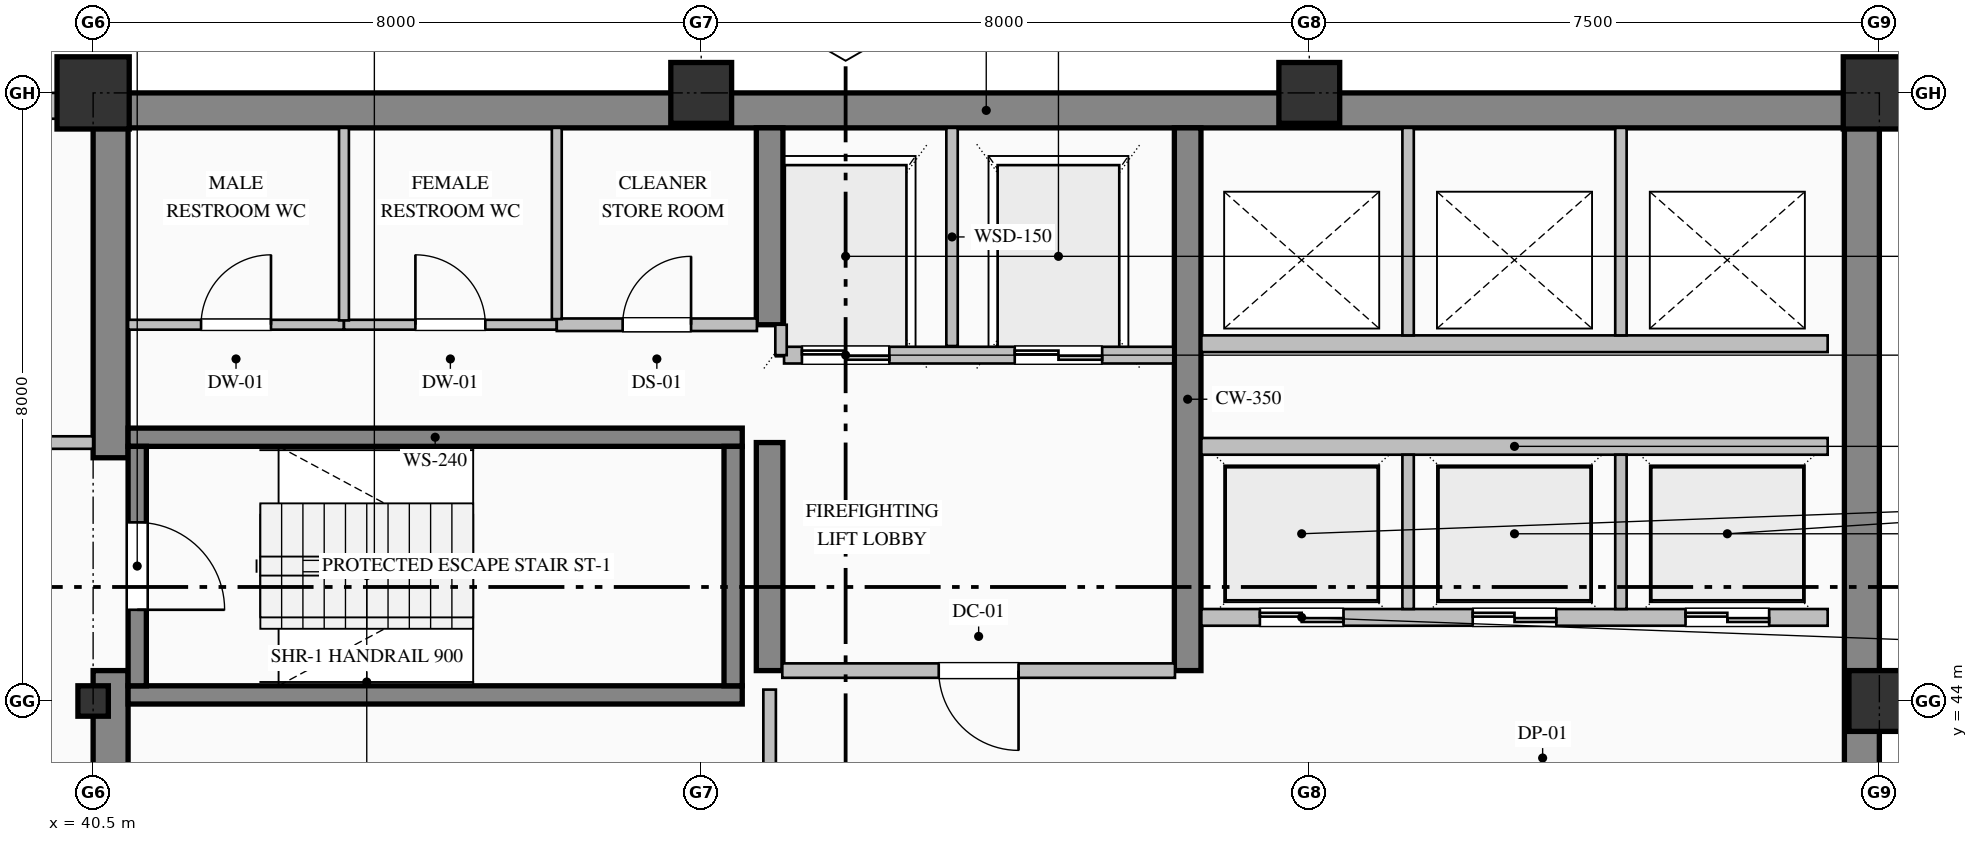
"""IFC4 building model, lengths in metres.
Left out: names, types, materials, properties, quantities, classifications, styles, units other than length and angle.
Written with IfcOpenShell. Run it as: python <this file> out.ifc"""

import sys

from ifc_helpers import new_model, si_unit, direction, frame, frame_2d, origin, origin_2d, place, context, subcontext, project, spatial, rectangle, hollow_rectangle, i_section, extrude, element, fill, save


model = new_model("IFC4")
c1 = context("Model", 3, precision=1e-05, world=origin(), true_north=direction((0.0, 1.0)))
c2 = subcontext(c1, "Body", "Model", "MODEL_VIEW")
j1 = project(units=[si_unit("LENGTHUNIT", "METRE"), si_unit("PLANEANGLEUNIT", "RADIAN")], contexts=[c1])
p1 = place(None, origin())
s1 = spatial("IfcSite", under=j1, at=p1, CompositionType="ELEMENT")
p2 = place(p1, origin())
s2 = spatial("IfcBuilding", under=s1, at=p2, CompositionType="ELEMENT")
p3 = place(p2, frame((0.0, 0.0, 269.8)))
s3 = spatial("IfcBuildingStorey", under=s2, at=p3, CompositionType="ELEMENT", Elevation=269.8)
p4 = place(p3, frame((40.5, 51.77, 0.0), z_axis=(0.0, 0.0, 1.0), x_axis=(1.0, 0.0, 0.0)))
e1 = element("IfcWall", 1, at=p4, inside=s3, PredefinedType="SHEAR", context=c2, shape_type="SweptSolid", body=[
    extrude(rectangle(XDim=23.5, YDim=0.46, at=frame_2d((11.75, 0.0))), origin(), (0.0, 0.0, 1.0), 3.775),
])
p5 = place(p3, frame((63.77, 36.32, 0.0), z_axis=(0.0, 0.0, 1.0), x_axis=(0.0, 1.0, 0.0)))
e2 = element("IfcWall", 2, at=p5, inside=s3, PredefinedType="SHEAR", context=c2, shape_type="SweptSolid", body=[
    extrude(rectangle(XDim=15.22, YDim=0.46, at=frame_2d((7.61, 0.0))), origin(), (0.0, 0.0, 1.0), 3.775),
])
p6 = place(p3, frame((40.73, 36.46, 0.0), z_axis=(0.0, 0.0, 1.0), x_axis=(0.0, 1.0, 0.0)))
e3 = element("IfcWall", 3, at=p6, inside=s3, PredefinedType="SHEAR", context=c2, shape_type="SweptSolid", body=[
    extrude(rectangle(XDim=7.94, YDim=0.46, at=frame_2d((3.97, 0.0))), origin(), (0.0, 0.0, 1.0), 3.775),
])
p7 = place(p3, frame((40.73, 47.2, 0.0), z_axis=(0.0, 0.0, 1.0), x_axis=(0.0, 1.0, 0.0)))
e4 = element("IfcWall", 4, at=p7, inside=s3, PredefinedType="SHEAR", context=c2, shape_type="SweptSolid", body=[
    extrude(rectangle(XDim=4.34, YDim=0.46, at=frame_2d((2.17, 0.0))), origin(), (0.0, 0.0, 1.0), 3.775),
])
p8 = place(p3, frame((49.4, 44.4, 0.0), z_axis=(0.0, 0.0, 1.0), x_axis=(0.0, 1.0, 0.0)))
e5 = element("IfcWall", 5, at=p8, inside=s3, PredefinedType="SHEAR", context=c2, shape_type="SweptSolid", body=[
    extrude(rectangle(XDim=3.0, YDim=0.35, at=frame_2d((1.5, 0.0))), origin(), (0.0, 0.0, 1.0), 3.775),
])
p9 = place(p3, frame((49.4, 48.95, 0.0), z_axis=(0.0, 0.0, 1.0), x_axis=(0.0, 1.0, 0.0)))
e6 = element("IfcWall", 6, at=p9, inside=s3, PredefinedType="SHEAR", context=c2, shape_type="SweptSolid", body=[
    extrude(rectangle(XDim=2.59, YDim=0.35, at=frame_2d((1.295, 0.0))), origin(), (0.0, 0.0, 1.0), 3.775),
])
p10 = place(p3, frame((54.9, 44.4, 0.0), z_axis=(0.0, 0.0, 1.0), x_axis=(0.0, 1.0, 0.0)))
e7 = element("IfcWall", 7, at=p10, inside=s3, PredefinedType="SHEAR", context=c2, shape_type="SweptSolid", body=[
    extrude(rectangle(XDim=7.14, YDim=0.35, at=frame_2d((3.57, 0.0))), origin(), (0.0, 0.0, 1.0), 3.775),
])
p11 = place(p3, frame((40.5, 44.0, 0.0), z_axis=(0.0, 0.0, 1.0), x_axis=(1.0, 0.0, 0.0)))
e8 = element("IfcColumn", 8, at=p11, inside=s3, PredefinedType="COLUMN", context=c2, shape_type="SweptSolid", body=[
    extrude(i_section(OverallWidth=0.4, OverallDepth=0.4, WebThickness=0.013, FlangeThickness=0.021, FilletRadius=0.022, at=origin_2d()), origin(), (0.0, 0.0, 1.0), 4.0),
])
p12 = place(p3, frame((40.5, 52.0, 0.0), z_axis=(0.0, 0.0, 1.0), x_axis=(1.0, 0.0, 0.0)))
e9 = element("IfcColumn", 9, at=p12, inside=s3, PredefinedType="COLUMN", context=c2, shape_type="SweptSolid", body=[
    extrude(hollow_rectangle(XDim=0.95, YDim=0.95, WallThickness=0.036, at=origin_2d()), origin(), (0.0, 0.0, 1.0), 4.0),
])
for number, where, z_axis, x_axis in (
    (10, (48.5, 52.0, 0.0), (0.0, 0.0, 1.0), (1.0, 0.0, 0.0)),
    (11, (56.5, 52.0, 0.0), (0.0, 0.0, 1.0), (1.0, 0.0, 0.0)),
    (12, (64.0, 44.0, 0.0), (0.0, 0.0, 1.0), (1.0, 0.0, 0.0)),
):
    element("IfcColumn", number, at=place(p3, frame(where, z_axis=z_axis, x_axis=x_axis)), inside=s3, PredefinedType="COLUMN", context=c2, shape_type="SweptSolid", body=[
        extrude(hollow_rectangle(XDim=0.8, YDim=0.8, WallThickness=0.032, at=origin_2d()), origin(), (0.0, 0.0, 1.0), 4.0),
    ])
p13 = place(p3, frame((64.0, 52.0, 0.0), z_axis=(0.0, 0.0, 1.0), x_axis=(1.0, 0.0, 0.0)))
e13 = element("IfcColumn", 13, at=p13, inside=s3, PredefinedType="COLUMN", context=c2, shape_type="SweptSolid", body=[
    extrude(hollow_rectangle(XDim=0.95, YDim=0.95, WallThickness=0.036, at=origin_2d()), origin(), (0.0, 0.0, 1.0), 4.0),
])
p14 = place(p3, frame((13.0, 51.83, 0.0), z_axis=(0.0, 0.0, 1.0), x_axis=(1.0, 0.0, 0.0)))
e14 = element("IfcWall", 14, at=p14, inside=s3, PredefinedType="SOLIDWALL", context=c2, shape_type="SweptSolid", body=[
    extrude(rectangle(XDim=27.52, YDim=0.34, at=frame_2d((13.76, 0.0))), origin(), (0.0, 0.0, 1.0), 3.325),
])
p15 = place(p14, frame((6.45, 0.0, 0.7)))
e15 = element("IfcOpeningElement", 15, at=p15, cuts=e14, PredefinedType="OPENING", context=c2, shape_type="SweptSolid", body=[
    extrude(rectangle(XDim=1.5, YDim=2.4, at=frame_2d((0.75, 1.2))), frame((0.0, 0.18, 0.0), z_axis=(0.0, -1.0, 0.0), x_axis=(1.0, 0.0, 0.0)), (0.0, 0.0, 1.0), 0.36),
])
p16 = place(p14, frame((17.25, 0.0, 0.7)))
e16 = element("IfcOpeningElement", 16, at=p16, cuts=e14, PredefinedType="OPENING", context=c2, shape_type="SweptSolid", body=[
    extrude(rectangle(XDim=1.5, YDim=2.4, at=frame_2d((0.75, 1.2))), frame((0.0, 0.18, 0.0), z_axis=(0.0, -1.0, 0.0), x_axis=(1.0, 0.0, 0.0)), (0.0, 0.0, 1.0), 0.36),
])
for number, where, z_axis, x_axis in (
    (17, (40.96, 47.47, 0.0), (0.0, 0.0, 1.0), (1.0, 0.0, 0.0)),
    (18, (49.04, 44.08, 0.0), (0.0, 0.0, 1.0), (-1.0, 0.0, 0.0)),
):
    element("IfcWall", number, at=place(p3, frame(where, z_axis=z_axis, x_axis=x_axis)), inside=s3, PredefinedType="SOLIDWALL", context=c2, shape_type="SweptSolid", body=[
        extrude(rectangle(XDim=8.08, YDim=0.24, at=frame_2d((4.04, 0.0))), origin(), (0.0, 0.0, 1.0), 4.0),
    ])
p17 = place(p3, frame((41.08, 47.35, 0.0), z_axis=(0.0, 0.0, 1.0), x_axis=(0.0, -1.0, 0.0)))
e19 = element("IfcWall", 19, at=p17, inside=s3, PredefinedType="SOLIDWALL", context=c2, shape_type="SweptSolid", body=[
    extrude(rectangle(XDim=3.15, YDim=0.24, at=frame_2d((1.575, 0.0))), origin(), (0.0, 0.0, 1.0), 4.0),
])
p18 = place(p17, frame((1.0, 0.0, 0.0)))
e20 = element("IfcOpeningElement", 20, at=p18, cuts=e19, PredefinedType="OPENING", context=c2, shape_type="SweptSolid", body=[
    extrude(rectangle(XDim=1.15, YDim=2.2, at=frame_2d((0.575, 1.1))), frame((0.0, 0.13, 0.0), z_axis=(0.0, -1.0, 0.0), x_axis=(1.0, 0.0, 0.0)), (0.0, 0.0, 1.0), 0.26),
])
p19 = place(p3, frame((48.92, 44.2, 0.0), z_axis=(0.0, 0.0, 1.0), x_axis=(0.0, 1.0, 0.0)))
e21 = element("IfcWall", 21, at=p19, inside=s3, PredefinedType="SOLIDWALL", context=c2, shape_type="SweptSolid", body=[
    extrude(rectangle(XDim=3.15, YDim=0.24, at=frame_2d((1.575, 0.0))), origin(), (0.0, 0.0, 1.0), 4.0),
])
p20 = place(p3, frame((54.71, 48.55, 0.0), z_axis=(0.0, 0.0, 1.0), x_axis=(-1.0, 0.0, 0.0)))
e22 = element("IfcWall", 22, at=p20, inside=s3, PredefinedType="PARTITIONING", context=c2, shape_type="SweptSolid", body=[
    extrude(rectangle(XDim=5.12, YDim=0.22, at=frame_2d((2.56, 0.0))), origin(), (0.0, 0.0, 1.0), 3.775),
])
p21 = place(p20, frame((3.735, 0.0, 0.0)))
e23 = element("IfcOpeningElement", 23, at=p21, cuts=e22, PredefinedType="OPENING", context=c2, shape_type="SweptSolid", body=[
    extrude(rectangle(XDim=1.15, YDim=2.2, at=frame_2d((0.575, 1.1))), frame((0.0, 0.12, 0.0), z_axis=(0.0, -1.0, 0.0), x_axis=(1.0, 0.0, 0.0)), (0.0, 0.0, 1.0), 0.24),
])
p22 = place(p20, frame((0.935, 0.0, 0.0)))
e24 = element("IfcOpeningElement", 24, at=p22, cuts=e22, PredefinedType="OPENING", context=c2, shape_type="SweptSolid", body=[
    extrude(rectangle(XDim=1.15, YDim=2.2, at=frame_2d((0.575, 1.1))), frame((0.0, 0.12, 0.0), z_axis=(0.0, -1.0, 0.0), x_axis=(1.0, 0.0, 0.0)), (0.0, 0.0, 1.0), 0.24),
])
p23 = place(p3, frame((51.8, 48.67, 0.0), z_axis=(0.0, 0.0, 1.0), x_axis=(0.0, 1.0, 0.0)))
e25 = element("IfcWall", 25, at=p23, inside=s3, PredefinedType="PARTITIONING", context=c2, shape_type="SweptSolid", body=[
    extrude(rectangle(XDim=2.87, YDim=0.15, at=frame_2d((1.435, 0.0))), origin(), (0.0, 0.0, 1.0), 3.775),
])
p24 = place(p3, frame((49.55, 48.55, 0.0), z_axis=(0.0, 0.0, 1.0), x_axis=(0.0, 1.0, 0.0)))
e26 = element("IfcWall", 26, at=p24, inside=s3, PredefinedType="PARTITIONING", context=c2, shape_type="SweptSolid", body=[
    extrude(rectangle(XDim=0.4, YDim=0.15, at=frame_2d((0.2, 0.0))), origin(), (0.0, 0.0, 1.0), 3.775),
])
p25 = place(p3, frame((63.32, 45.1, 0.0), z_axis=(0.0, 0.0, 1.0), x_axis=(-1.0, 0.0, 0.0)))
e27 = element("IfcWall", 27, at=p25, inside=s3, PredefinedType="PARTITIONING", context=c2, shape_type="SweptSolid", body=[
    extrude(rectangle(XDim=8.24, YDim=0.22, at=frame_2d((4.12, 0.0))), origin(), (0.0, 0.0, 1.0), 3.775),
])
p26 = place(p25, frame((6.37, 0.0, 0.0)))
e28 = element("IfcOpeningElement", 28, at=p26, cuts=e27, PredefinedType="OPENING", context=c2, shape_type="SweptSolid", body=[
    extrude(rectangle(XDim=1.1, YDim=2.2, at=frame_2d((0.55, 1.1))), frame((0.0, 0.12, 0.0), z_axis=(0.0, -1.0, 0.0), x_axis=(1.0, 0.0, 0.0)), (0.0, 0.0, 1.0), 0.24),
])
p27 = place(p25, frame((3.57, 0.0, 0.0)))
e29 = element("IfcOpeningElement", 29, at=p27, cuts=e27, PredefinedType="OPENING", context=c2, shape_type="SweptSolid", body=[
    extrude(rectangle(XDim=1.1, YDim=2.2, at=frame_2d((0.55, 1.1))), frame((0.0, 0.12, 0.0), z_axis=(0.0, -1.0, 0.0), x_axis=(1.0, 0.0, 0.0)), (0.0, 0.0, 1.0), 0.24),
])
p28 = place(p25, frame((0.77, 0.0, 0.0)))
e30 = element("IfcOpeningElement", 30, at=p28, cuts=e27, PredefinedType="OPENING", context=c2, shape_type="SweptSolid", body=[
    extrude(rectangle(XDim=1.1, YDim=2.2, at=frame_2d((0.55, 1.1))), frame((0.0, 0.12, 0.0), z_axis=(0.0, -1.0, 0.0), x_axis=(1.0, 0.0, 0.0)), (0.0, 0.0, 1.0), 0.24),
])
p29 = place(p3, frame((55.08, 47.35, 0.0), z_axis=(0.0, 0.0, 1.0), x_axis=(1.0, 0.0, 0.0)))
e31 = element("IfcWall", 31, at=p29, inside=s3, PredefinedType="PARTITIONING", context=c2, shape_type="SweptSolid", body=[
    extrude(rectangle(XDim=8.24, YDim=0.22, at=frame_2d((4.12, 0.0))), origin(), (0.0, 0.0, 1.0), 3.775),
])
for number, where, z_axis, x_axis in (
    (32, (57.8, 45.21, 0.0), (0.0, 0.0, 1.0), (0.0, 1.0, 0.0)),
    (33, (60.6, 45.21, 0.0), (0.0, 0.0, 1.0), (0.0, 1.0, 0.0)),
):
    element("IfcWall", number, at=place(p3, frame(where, z_axis=z_axis, x_axis=x_axis)), inside=s3, PredefinedType="PARTITIONING", context=c2, shape_type="SweptSolid", body=[
        extrude(rectangle(XDim=2.03, YDim=0.15, at=frame_2d((1.015, 0.0))), origin(), (0.0, 0.0, 1.0), 3.775),
    ])
p30 = place(p3, frame((63.32, 48.7, 0.0), z_axis=(0.0, 0.0, 1.0), x_axis=(-1.0, 0.0, 0.0)))
e34 = element("IfcWall", 34, at=p30, inside=s3, PredefinedType="PARTITIONING", context=c2, shape_type="SweptSolid", body=[
    extrude(rectangle(XDim=8.24, YDim=0.22, at=frame_2d((4.12, 0.0))), origin(), (0.0, 0.0, 1.0), 3.775),
])
for number, where, z_axis, x_axis in (
    (35, (57.8, 48.81, 0.0), (0.0, 0.0, 1.0), (0.0, 1.0, 0.0)),
    (36, (60.6, 48.81, 0.0), (0.0, 0.0, 1.0), (0.0, 1.0, 0.0)),
):
    element("IfcWall", number, at=place(p3, frame(where, z_axis=z_axis, x_axis=x_axis)), inside=s3, PredefinedType="PARTITIONING", context=c2, shape_type="SweptSolid", body=[
        extrude(rectangle(XDim=2.73, YDim=0.15, at=frame_2d((1.365, 0.0))), origin(), (0.0, 0.0, 1.0), 3.775),
    ])
p31 = place(p3, frame((37.8, 47.4, 0.0), z_axis=(0.0, 0.0, 1.0), x_axis=(1.0, 0.0, 0.0)))
e37 = element("IfcWall", 37, at=p31, inside=s3, PredefinedType="PARTITIONING", context=c2, shape_type="SweptSolid", body=[
    extrude(rectangle(XDim=2.7, YDim=0.165, at=frame_2d((1.35, 0.0))), origin(), (0.0, 0.0, 1.0), 3.775),
])
p32 = place(p31, frame((0.825, 0.0, 0.0)))
e38 = element("IfcOpeningElement", 38, at=p32, cuts=e37, PredefinedType="OPENING", context=c2, shape_type="SweptSolid", body=[
    extrude(rectangle(XDim=1.05, YDim=2.15, at=frame_2d((0.525, 1.075))), frame((0.0, 0.093, 0.0), z_axis=(0.0, -1.0, 0.0), x_axis=(1.0, 0.0, 0.0)), (0.0, 0.0, 1.0), 0.185),
])
p33 = place(p3, frame((40.96, 48.95, 0.0), z_axis=(0.0, 0.0, 1.0), x_axis=(1.0, 0.0, 0.0)))
e39 = element("IfcWall", 39, at=p33, inside=s3, PredefinedType="PARTITIONING", context=c2, shape_type="SweptSolid", body=[
    extrude(rectangle(XDim=2.84, YDim=0.13, at=frame_2d((1.42, 0.0))), origin(), (0.0, 0.0, 1.0), 3.775),
])
p34 = place(p33, frame((0.96, 0.0, 0.0)))
e40 = element("IfcOpeningElement", 40, at=p34, cuts=e39, PredefinedType="OPENING", context=c2, shape_type="SweptSolid", body=[
    extrude(rectangle(XDim=0.92, YDim=2.15, at=frame_2d((0.46, 1.075))), frame((0.0, 0.075, 0.0), z_axis=(0.0, -1.0, 0.0), x_axis=(1.0, 0.0, 0.0)), (0.0, 0.0, 1.0), 0.15),
])
p35 = place(p3, frame((43.8, 48.95, 0.0), z_axis=(0.0, 0.0, 1.0), x_axis=(1.0, 0.0, 0.0)))
e41 = element("IfcWall", 41, at=p35, inside=s3, PredefinedType="PARTITIONING", context=c2, shape_type="SweptSolid", body=[
    extrude(rectangle(XDim=2.8, YDim=0.13, at=frame_2d((1.4, 0.0))), origin(), (0.0, 0.0, 1.0), 3.775),
])
p36 = place(p35, frame((0.94, 0.0, 0.0)))
e42 = element("IfcOpeningElement", 42, at=p36, cuts=e41, PredefinedType="OPENING", context=c2, shape_type="SweptSolid", body=[
    extrude(rectangle(XDim=0.92, YDim=2.15, at=frame_2d((0.46, 1.075))), frame((0.0, 0.075, 0.0), z_axis=(0.0, -1.0, 0.0), x_axis=(1.0, 0.0, 0.0)), (0.0, 0.0, 1.0), 0.15),
])
p37 = place(p3, frame((46.6, 48.95, 0.0), z_axis=(0.0, 0.0, 1.0), x_axis=(1.0, 0.0, 0.0)))
e43 = element("IfcWall", 43, at=p37, inside=s3, PredefinedType="PARTITIONING", context=c2, shape_type="SweptSolid", body=[
    extrude(rectangle(XDim=2.633, YDim=0.165, at=frame_2d((1.316, 0.0))), origin(), (0.0, 0.0, 1.0), 3.775),
])
p38 = place(p37, frame((0.866, 0.0, 0.0)))
e44 = element("IfcOpeningElement", 44, at=p38, cuts=e43, PredefinedType="OPENING", context=c2, shape_type="SweptSolid", body=[
    extrude(rectangle(XDim=0.9, YDim=2.15, at=frame_2d((0.45, 1.075))), frame((0.0, 0.093, 0.0), z_axis=(0.0, -1.0, 0.0), x_axis=(1.0, 0.0, 0.0)), (0.0, 0.0, 1.0), 0.185),
])
p39 = place(p3, frame((54.733, 44.4, 0.0), z_axis=(0.0, 0.0, 1.0), x_axis=(-1.0, 0.0, 0.0)))
e45 = element("IfcWall", 45, at=p39, inside=s3, PredefinedType="PARTITIONING", context=c2, shape_type="SweptSolid", body=[
    extrude(rectangle(XDim=5.166, YDim=0.19, at=frame_2d((2.583, 0.0))), origin(), (0.0, 0.0, 1.0), 3.775),
])
p40 = place(p39, frame((2.058, 0.0, 0.0)))
e46 = element("IfcOpeningElement", 46, at=p40, cuts=e45, PredefinedType="OPENING", context=c2, shape_type="SweptSolid", body=[
    extrude(rectangle(XDim=1.05, YDim=2.15, at=frame_2d((0.525, 1.075))), frame((0.0, 0.105, 0.0), z_axis=(0.0, -1.0, 0.0), x_axis=(1.0, 0.0, 0.0)), (0.0, 0.0, 1.0), 0.21),
])
p41 = place(p3, frame((49.4, 39.647, 0.0), z_axis=(0.0, 0.0, 1.0), x_axis=(0.0, 1.0, 0.0)))
e47 = element("IfcWall", 47, at=p41, inside=s3, PredefinedType="PARTITIONING", context=c2, shape_type="SweptSolid", body=[
    extrude(rectangle(XDim=4.503, YDim=0.165, at=frame_2d((2.251, 0.0))), origin(), (0.0, 0.0, 1.0), 3.017),
])
p42 = place(p41, frame((1.802, 0.0, 0.0)))
e48 = element("IfcOpeningElement", 48, at=p42, cuts=e47, PredefinedType="OPENING", context=c2, shape_type="SweptSolid", body=[
    extrude(rectangle(XDim=0.9, YDim=2.15, at=frame_2d((0.45, 1.075))), frame((0.0, 0.093, 0.0), z_axis=(0.0, -1.0, 0.0), x_axis=(1.0, 0.0, 0.0)), (0.0, 0.0, 1.0), 0.185),
])
p43 = place(p3, frame((43.8, 51.54, 0.0), z_axis=(0.0, 0.0, 1.0), x_axis=(0.0, -1.0, 0.0)))
e49 = element("IfcWall", 49, at=p43, inside=s3, PredefinedType="PARTITIONING", context=c2, shape_type="SweptSolid", body=[
    extrude(rectangle(XDim=2.533, YDim=0.13, at=frame_2d((1.267, 0.0))), origin(), (0.0, 0.0, 1.0), 3.775),
])
p44 = place(p3, frame((46.6, 51.54, 0.0), z_axis=(0.0, 0.0, 1.0), x_axis=(0.0, -1.0, 0.0)))
e50 = element("IfcWall", 50, at=p44, inside=s3, PredefinedType="PARTITIONING", context=c2, shape_type="SweptSolid", body=[
    extrude(rectangle(XDim=2.516, YDim=0.13, at=frame_2d((1.258, 0.0))), origin(), (0.0, 0.0, 1.0), 3.775),
])
p45 = place(p18, origin())
e51 = element("IfcDoor", 51, at=p45, inside=s3, OperationType="SINGLE_SWING_RIGHT", PredefinedType="DOOR", context=c2, shape_type="SweptSolid", body=[
    extrude(rectangle(XDim=1.15, YDim=2.2, at=frame_2d((0.575, 1.1))), frame((0.0, 0.025, 0.0), z_axis=(0.0, -1.0, 0.0), x_axis=(1.0, 0.0, 0.0)), (0.0, 0.0, 1.0), 0.05),
])
fill(e20, e51)
p46 = place(p21, origin())
e52 = element("IfcDoor", 52, at=p46, inside=s3, OperationType="DOUBLE_DOOR_SLIDING", PredefinedType="DOOR", context=c2, shape_type="SweptSolid", body=[
    extrude(rectangle(XDim=1.15, YDim=2.2, at=frame_2d((0.575, 1.1))), frame((0.0, 0.025, 0.0), z_axis=(0.0, -1.0, 0.0), x_axis=(1.0, 0.0, 0.0)), (0.0, 0.0, 1.0), 0.05),
])
fill(e23, e52)
p47 = place(p22, origin())
e53 = element("IfcDoor", 53, at=p47, inside=s3, OperationType="DOUBLE_DOOR_SLIDING", PredefinedType="DOOR", context=c2, shape_type="SweptSolid", body=[
    extrude(rectangle(XDim=1.15, YDim=2.2, at=frame_2d((0.575, 1.1))), frame((0.0, 0.025, 0.0), z_axis=(0.0, -1.0, 0.0), x_axis=(1.0, 0.0, 0.0)), (0.0, 0.0, 1.0), 0.05),
])
fill(e24, e53)
p48 = place(p26, origin())
e54 = element("IfcDoor", 54, at=p48, inside=s3, OperationType="DOUBLE_DOOR_SLIDING", PredefinedType="DOOR", context=c2, shape_type="SweptSolid", body=[
    extrude(rectangle(XDim=1.1, YDim=2.2, at=frame_2d((0.55, 1.1))), frame((0.0, 0.025, 0.0), z_axis=(0.0, -1.0, 0.0), x_axis=(1.0, 0.0, 0.0)), (0.0, 0.0, 1.0), 0.05),
])
fill(e28, e54)
p49 = place(p27, origin())
e55 = element("IfcDoor", 55, at=p49, inside=s3, OperationType="DOUBLE_DOOR_SLIDING", PredefinedType="DOOR", context=c2, shape_type="SweptSolid", body=[
    extrude(rectangle(XDim=1.1, YDim=2.2, at=frame_2d((0.55, 1.1))), frame((0.0, 0.025, 0.0), z_axis=(0.0, -1.0, 0.0), x_axis=(1.0, 0.0, 0.0)), (0.0, 0.0, 1.0), 0.05),
])
fill(e29, e55)
p50 = place(p28, origin())
e56 = element("IfcDoor", 56, at=p50, inside=s3, OperationType="DOUBLE_DOOR_SLIDING", PredefinedType="DOOR", context=c2, shape_type="SweptSolid", body=[
    extrude(rectangle(XDim=1.1, YDim=2.2, at=frame_2d((0.55, 1.1))), frame((0.0, 0.025, 0.0), z_axis=(0.0, -1.0, 0.0), x_axis=(1.0, 0.0, 0.0)), (0.0, 0.0, 1.0), 0.05),
])
fill(e30, e56)
p51 = place(p40, origin())
e57 = element("IfcDoor", 57, at=p51, inside=s3, OperationType="SINGLE_SWING_LEFT", PredefinedType="DOOR", context=c2, shape_type="SweptSolid", body=[
    extrude(rectangle(XDim=1.05, YDim=2.15, at=frame_2d((0.525, 1.075))), frame((0.0, 0.025, 0.0), z_axis=(0.0, -1.0, 0.0), x_axis=(1.0, 0.0, 0.0)), (0.0, 0.0, 1.0), 0.05),
])
fill(e46, e57)
p52 = place(p34, origin())
e58 = element("IfcDoor", 58, at=p52, inside=s3, OperationType="SINGLE_SWING_RIGHT", PredefinedType="DOOR", context=c2, shape_type="SweptSolid", body=[
    extrude(rectangle(XDim=0.92, YDim=2.15, at=frame_2d((0.46, 1.075))), frame((0.0, 0.025, 0.0), z_axis=(0.0, -1.0, 0.0), x_axis=(1.0, 0.0, 0.0)), (0.0, 0.0, 1.0), 0.05),
])
fill(e40, e58)
p53 = place(p36, origin())
e59 = element("IfcDoor", 59, at=p53, inside=s3, OperationType="SINGLE_SWING_LEFT", PredefinedType="DOOR", context=c2, shape_type="SweptSolid", body=[
    extrude(rectangle(XDim=0.92, YDim=2.15, at=frame_2d((0.46, 1.075))), frame((0.0, 0.025, 0.0), z_axis=(0.0, -1.0, 0.0), x_axis=(1.0, 0.0, 0.0)), (0.0, 0.0, 1.0), 0.05),
])
fill(e42, e59)
p54 = place(p38, origin())
e60 = element("IfcDoor", 60, at=p54, inside=s3, OperationType="SINGLE_SWING_RIGHT", PredefinedType="DOOR", context=c2, shape_type="SweptSolid", body=[
    extrude(rectangle(XDim=0.9, YDim=2.15, at=frame_2d((0.45, 1.075))), frame((0.0, 0.025, 0.0), z_axis=(0.0, -1.0, 0.0), x_axis=(1.0, 0.0, 0.0)), (0.0, 0.0, 1.0), 0.05),
])
fill(e44, e60)
save(model, sys.argv[1])
